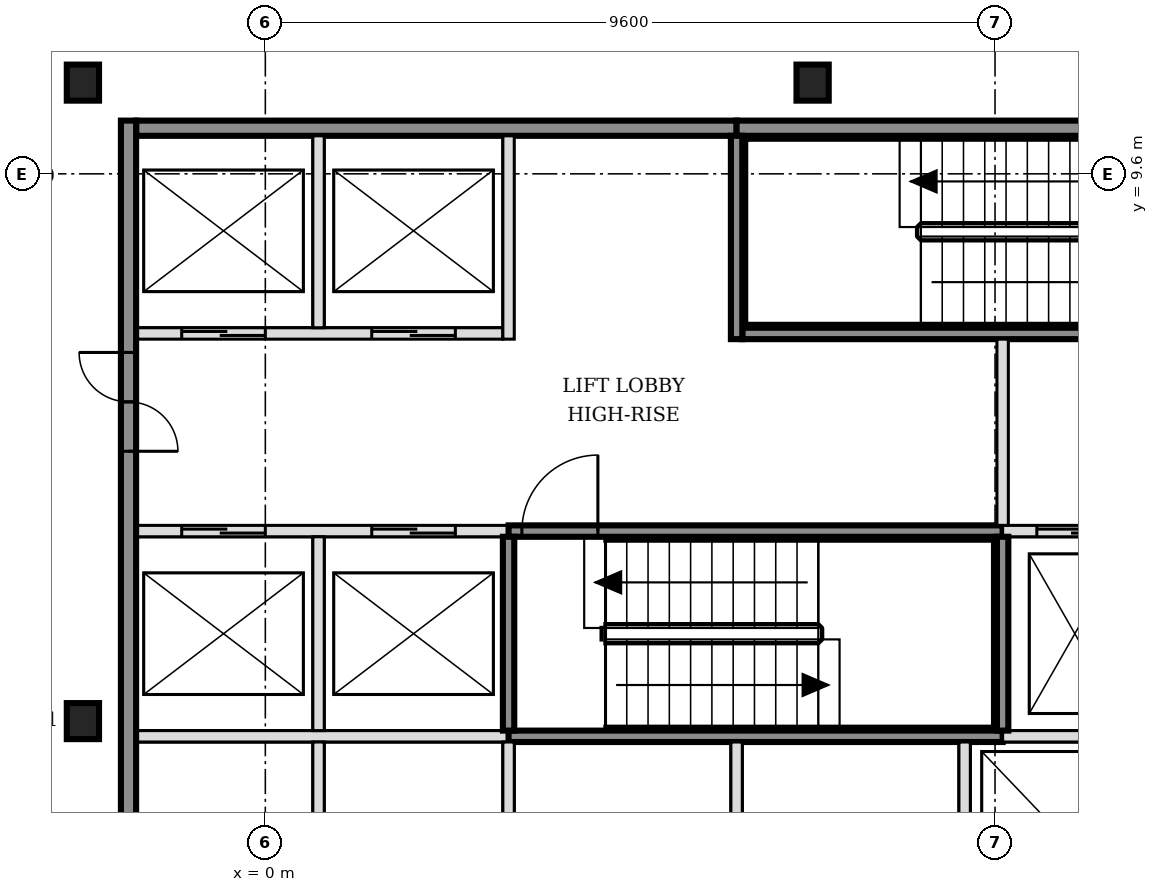
"""IFC4 building model, lengths in metres.
Left out: names, types, materials, properties, quantities, classifications, styles, units other than length and angle.
Written with IfcOpenShell. Run it as: python <this file> out.ifc"""

import sys

from ifc_helpers import new_model, si_unit, direction, frame, frame_2d, origin, origin_2d, place, context, subcontext, project, spatial, rectangle, i_section, extrude, element, fill, save


model = new_model("IFC4")
c1 = context("Model", 3, precision=1e-05, world=origin(), true_north=direction((0.0, 1.0)))
c2 = subcontext(c1, "Body", "Model", "MODEL_VIEW")
j1 = project(units=[si_unit("LENGTHUNIT", "METRE"), si_unit("PLANEANGLEUNIT", "RADIAN")], contexts=[c1])
p1 = place(None, origin())
s1 = spatial("IfcSite", under=j1, at=p1, CompositionType="ELEMENT")
p2 = place(p1, origin())
s2 = spatial("IfcBuilding", under=s1, at=p2, CompositionType="ELEMENT")
p3 = place(p2, frame((0.0, 0.0, 129.0)))
s3 = spatial("IfcBuildingStorey", under=s2, at=p3, CompositionType="ELEMENT", Elevation=129.0)
for number, where, z_axis, x_axis in (
    (1, (-2.4, 2.4, -0.15), (0.0, 0.0, 1.0), (1.0, 0.0, 0.0)),
    (2, (-2.4, 10.8, -0.15), (0.0, 0.0, 1.0), (1.0, 0.0, 0.0)),
    (3, (7.2, 10.8, -0.15), (0.0, 0.0, 1.0), (1.0, 0.0, 0.0)),
):
    element("IfcColumn", number, at=place(p3, frame(where, z_axis=z_axis, x_axis=x_axis)), inside=s3, PredefinedType="COLUMN", context=c2, shape_type="SweptSolid", body=[
        extrude(i_section(OverallWidth=0.424, OverallDepth=0.474, WebThickness=0.048, FlangeThickness=0.077, FilletRadius=0.015, at=origin_2d()), origin(), (0.0, 0.0, 1.0), 3.6),
    ])
p4 = place(p3, frame((-1.7, 2.2, 0.0), z_axis=(0.0, 0.0, 1.0), x_axis=(1.0, 0.0, 0.0)))
e4 = element("IfcWall", 4, at=p4, inside=s3, PredefinedType="SOLIDWALL", context=c2, shape_type="SweptSolid", body=[
    extrude(rectangle(XDim=4.9, YDim=0.15, at=frame_2d((2.45, 0.0))), origin(), (0.0, 0.0, 1.0), 3.45),
])
p5 = place(p3, frame((3.2, 2.2, 0.0), z_axis=(0.0, 0.0, 1.0), x_axis=(1.0, 0.0, 0.0)))
e5 = element("IfcWall", 5, at=p5, inside=s3, PredefinedType="SOLIDWALL", context=c2, shape_type="SweptSolid", body=[
    extrude(rectangle(XDim=6.5, YDim=0.15, at=frame_2d((3.25, 0.0))), origin(), (0.0, 0.0, 1.0), 3.45),
])
p6 = place(p3, frame((9.7, 2.2, 0.0), z_axis=(0.0, 0.0, 1.0), x_axis=(1.0, 0.0, 0.0)))
e6 = element("IfcWall", 6, at=p6, inside=s3, PredefinedType="SOLIDWALL", context=c2, shape_type="SweptSolid", body=[
    extrude(rectangle(XDim=4.525, YDim=0.15, at=frame_2d((2.263, 0.0))), origin(), (0.0, 0.0, 1.0), 3.45),
])
p7 = place(p3, frame((-1.7, 4.9, 0.0), z_axis=(0.0, 0.0, 1.0), x_axis=(1.0, 0.0, 0.0)))
e7 = element("IfcWall", 7, at=p7, inside=s3, PredefinedType="SOLIDWALL", context=c2, shape_type="SweptSolid", body=[
    extrude(rectangle(XDim=4.9, YDim=0.15, at=frame_2d((2.45, 0.0))), origin(), (0.0, 0.0, 1.0), 3.45),
])
p8 = place(p7, frame((0.6, 0.0, 0.0)))
e8 = element("IfcOpeningElement", 8, at=p8, cuts=e7, PredefinedType="OPENING", context=c2, shape_type="SweptSolid", body=[
    extrude(rectangle(XDim=1.1, YDim=2.1, at=frame_2d((0.55, 1.05))), frame((0.0, 0.085, 0.0), z_axis=(0.0, -1.0, 0.0), x_axis=(1.0, 0.0, 0.0)), (0.0, 0.0, 1.0), 0.17),
])
p9 = place(p7, frame((3.1, 0.0, 0.0)))
e9 = element("IfcOpeningElement", 9, at=p9, cuts=e7, PredefinedType="OPENING", context=c2, shape_type="SweptSolid", body=[
    extrude(rectangle(XDim=1.1, YDim=2.1, at=frame_2d((0.55, 1.05))), frame((0.0, 0.085, 0.0), z_axis=(0.0, -1.0, 0.0), x_axis=(1.0, 0.0, 0.0)), (0.0, 0.0, 1.0), 0.17),
])
p10 = place(p3, frame((3.2, 4.9, 0.0), z_axis=(0.0, 0.0, 1.0), x_axis=(1.0, 0.0, 0.0)))
e10 = element("IfcWall", 10, at=p10, inside=s3, PredefinedType="SOLIDWALL", context=c2, shape_type="SweptSolid", body=[
    extrude(rectangle(XDim=6.5, YDim=0.15, at=frame_2d((3.25, 0.0))), origin(), (0.0, 0.0, 1.0), 3.45),
])
p11 = place(p10, frame((0.175, 0.0, 0.0)))
e11 = element("IfcOpeningElement", 11, at=p11, cuts=e10, PredefinedType="OPENING", context=c2, shape_type="SweptSolid", body=[
    extrude(rectangle(XDim=1.0, YDim=2.1, at=frame_2d((0.5, 1.05))), frame((0.0, 0.085, 0.0), z_axis=(0.0, -1.0, 0.0), x_axis=(1.0, 0.0, 0.0)), (0.0, 0.0, 1.0), 0.17),
])
p12 = place(p3, frame((9.7, 4.9, 0.0), z_axis=(0.0, 0.0, 1.0), x_axis=(1.0, 0.0, 0.0)))
e12 = element("IfcWall", 12, at=p12, inside=s3, PredefinedType="SOLIDWALL", context=c2, shape_type="SweptSolid", body=[
    extrude(rectangle(XDim=6.4, YDim=0.15, at=frame_2d((3.2, 0.0))), origin(), (0.0, 0.0, 1.0), 3.45),
])
p13 = place(p12, frame((0.45, 0.0, 0.0)))
e13 = element("IfcOpeningElement", 13, at=p13, cuts=e12, PredefinedType="OPENING", context=c2, shape_type="SweptSolid", body=[
    extrude(rectangle(XDim=1.0, YDim=2.1, at=frame_2d((0.5, 1.05))), frame((0.0, 0.085, 0.0), z_axis=(0.0, -1.0, 0.0), x_axis=(1.0, 0.0, 0.0)), (0.0, 0.0, 1.0), 0.17),
])
p14 = place(p12, frame((2.35, 0.0, 0.0)))
e14 = element("IfcOpeningElement", 14, at=p14, cuts=e12, PredefinedType="OPENING", context=c2, shape_type="SweptSolid", body=[
    extrude(rectangle(XDim=1.0, YDim=2.1, at=frame_2d((0.5, 1.05))), frame((0.0, 0.085, 0.0), z_axis=(0.0, -1.0, 0.0), x_axis=(1.0, 0.0, 0.0)), (0.0, 0.0, 1.0), 0.17),
])
p15 = place(p12, frame((4.7, 0.0, 0.0)))
e15 = element("IfcOpeningElement", 15, at=p15, cuts=e12, PredefinedType="OPENING", context=c2, shape_type="SweptSolid", body=[
    extrude(rectangle(XDim=0.9, YDim=2.1, at=frame_2d((0.45, 1.05))), frame((0.0, 0.085, 0.0), z_axis=(0.0, -1.0, 0.0), x_axis=(1.0, 0.0, 0.0)), (0.0, 0.0, 1.0), 0.17),
])
p16 = place(p3, frame((-1.7, 7.5, 0.0), z_axis=(0.0, 0.0, 1.0), x_axis=(1.0, 0.0, 0.0)))
e16 = element("IfcWall", 16, at=p16, inside=s3, PredefinedType="SOLIDWALL", context=c2, shape_type="SweptSolid", body=[
    extrude(rectangle(XDim=4.825, YDim=0.15, at=frame_2d((2.413, 0.0))), origin(), (0.0, 0.0, 1.0), 3.45),
])
p17 = place(p16, frame((0.6, 0.0, 0.0)))
e17 = element("IfcOpeningElement", 17, at=p17, cuts=e16, PredefinedType="OPENING", context=c2, shape_type="SweptSolid", body=[
    extrude(rectangle(XDim=1.1, YDim=2.1, at=frame_2d((0.55, 1.05))), frame((0.0, 0.085, 0.0), z_axis=(0.0, -1.0, 0.0), x_axis=(1.0, 0.0, 0.0)), (0.0, 0.0, 1.0), 0.17),
])
p18 = place(p16, frame((3.1, 0.0, 0.0)))
e18 = element("IfcOpeningElement", 18, at=p18, cuts=e16, PredefinedType="OPENING", context=c2, shape_type="SweptSolid", body=[
    extrude(rectangle(XDim=1.1, YDim=2.1, at=frame_2d((0.55, 1.05))), frame((0.0, 0.085, 0.0), z_axis=(0.0, -1.0, 0.0), x_axis=(1.0, 0.0, 0.0)), (0.0, 0.0, 1.0), 0.17),
])
p19 = place(p3, frame((6.275, 7.5, 0.0), z_axis=(0.0, 0.0, 1.0), x_axis=(1.0, 0.0, 0.0)))
e19 = element("IfcWall", 19, at=p19, inside=s3, PredefinedType="SOLIDWALL", context=c2, shape_type="SweptSolid", body=[
    extrude(rectangle(XDim=6.425, YDim=0.15, at=frame_2d((3.212, 0.0))), origin(), (0.0, 0.0, 1.0), 3.45),
])
p20 = place(p19, frame((5.225, 0.0, 0.0)))
e20 = element("IfcOpeningElement", 20, at=p20, cuts=e19, PredefinedType="OPENING", context=c2, shape_type="SweptSolid", body=[
    extrude(rectangle(XDim=1.0, YDim=2.1, at=frame_2d((0.5, 1.05))), frame((0.0, 0.085, 0.0), z_axis=(0.0, -1.0, 0.0), x_axis=(1.0, 0.0, 0.0)), (0.0, 0.0, 1.0), 0.17),
])
p21 = place(p3, frame((-1.7, 10.2, 0.0), z_axis=(0.0, 0.0, 1.0), x_axis=(1.0, 0.0, 0.0)))
e21 = element("IfcWall", 21, at=p21, inside=s3, PredefinedType="SOLIDWALL", context=c2, shape_type="SweptSolid", body=[
    extrude(rectangle(XDim=7.9, YDim=0.2, at=frame_2d((3.95, 0.0))), origin(), (0.0, 0.0, 1.0), 3.45),
])
p22 = place(p3, frame((6.2, 10.2, 0.0), z_axis=(0.0, 0.0, 1.0), x_axis=(1.0, 0.0, 0.0)))
e22 = element("IfcWall", 22, at=p22, inside=s3, PredefinedType="SOLIDWALL", context=c2, shape_type="SweptSolid", body=[
    extrude(rectangle(XDim=6.5, YDim=0.2, at=frame_2d((3.25, 0.0))), origin(), (0.0, 0.0, 1.0), 3.45),
])
p23 = place(p3, frame((-1.8, -5.5, 0.0), z_axis=(0.0, 0.0, 1.0), x_axis=(0.0, 1.0, 0.0)))
e23 = element("IfcWall", 23, at=p23, inside=s3, PredefinedType="SOLIDWALL", context=c2, shape_type="SweptSolid", body=[
    extrude(rectangle(XDim=15.8, YDim=0.2, at=frame_2d((7.9, 0.0))), origin(), (0.0, 0.0, 1.0), 3.45),
])
p24 = place(p23, frame((3.05, 0.0, 0.0)))
e24 = element("IfcOpeningElement", 24, at=p24, cuts=e23, PredefinedType="OPENING", context=c2, shape_type="SweptSolid", body=[
    extrude(rectangle(XDim=1.3, YDim=2.1, at=frame_2d((0.65, 1.05))), frame((0.0, 0.11, 0.0), z_axis=(0.0, -1.0, 0.0), x_axis=(1.0, 0.0, 0.0)), (0.0, 0.0, 1.0), 0.22),
])
p25 = place(p23, frame((11.45, 0.0, 0.0)))
e25 = element("IfcOpeningElement", 25, at=p25, cuts=e23, PredefinedType="OPENING", context=c2, shape_type="SweptSolid", body=[
    extrude(rectangle(XDim=1.3, YDim=2.1, at=frame_2d((0.65, 1.05))), frame((0.0, 0.11, 0.0), z_axis=(0.0, -1.0, 0.0), x_axis=(1.0, 0.0, 0.0)), (0.0, 0.0, 1.0), 0.22),
])
p26 = place(p3, frame((0.7, -0.325, 0.0), z_axis=(0.0, 0.0, 1.0), x_axis=(0.0, 1.0, 0.0)))
e26 = element("IfcWall", 26, at=p26, inside=s3, PredefinedType="SOLIDWALL", context=c2, shape_type="SweptSolid", body=[
    extrude(rectangle(XDim=2.45, YDim=0.15, at=frame_2d((1.225, 0.0))), origin(), (0.0, 0.0, 1.0), 3.45),
])
p27 = place(p3, frame((0.7, 2.275, 0.0), z_axis=(0.0, 0.0, 1.0), x_axis=(0.0, 1.0, 0.0)))
e27 = element("IfcWall", 27, at=p27, inside=s3, PredefinedType="SOLIDWALL", context=c2, shape_type="SweptSolid", body=[
    extrude(rectangle(XDim=2.55, YDim=0.15, at=frame_2d((1.275, 0.0))), origin(), (0.0, 0.0, 1.0), 3.45),
])
p28 = place(p3, frame((0.7, 7.575, 0.0), z_axis=(0.0, 0.0, 1.0), x_axis=(0.0, 1.0, 0.0)))
e28 = element("IfcWall", 28, at=p28, inside=s3, PredefinedType="SOLIDWALL", context=c2, shape_type="SweptSolid", body=[
    extrude(rectangle(XDim=2.525, YDim=0.15, at=frame_2d((1.263, 0.0))), origin(), (0.0, 0.0, 1.0), 3.45),
])
p29 = place(p3, frame((3.2, -0.325, 0.0), z_axis=(0.0, 0.0, 1.0), x_axis=(0.0, 1.0, 0.0)))
e29 = element("IfcWall", 29, at=p29, inside=s3, PredefinedType="SOLIDWALL", context=c2, shape_type="SweptSolid", body=[
    extrude(rectangle(XDim=2.45, YDim=0.15, at=frame_2d((1.225, 0.0))), origin(), (0.0, 0.0, 1.0), 3.45),
])
p30 = place(p3, frame((3.2, 2.275, 0.0), z_axis=(0.0, 0.0, 1.0), x_axis=(0.0, 1.0, 0.0)))
e30 = element("IfcWall", 30, at=p30, inside=s3, PredefinedType="SOLIDWALL", context=c2, shape_type="SweptSolid", body=[
    extrude(rectangle(XDim=2.55, YDim=0.15, at=frame_2d((1.275, 0.0))), origin(), (0.0, 0.0, 1.0), 3.45),
])
p31 = place(p3, frame((3.2, 7.425, 0.0), z_axis=(0.0, 0.0, 1.0), x_axis=(0.0, 1.0, 0.0)))
e31 = element("IfcWall", 31, at=p31, inside=s3, PredefinedType="SOLIDWALL", context=c2, shape_type="SweptSolid", body=[
    extrude(rectangle(XDim=2.675, YDim=0.15, at=frame_2d((1.337, 0.0))), origin(), (0.0, 0.0, 1.0), 3.45),
])
p32 = place(p3, frame((6.2, -0.325, 0.0), z_axis=(0.0, 0.0, 1.0), x_axis=(0.0, 1.0, 0.0)))
e32 = element("IfcWall", 32, at=p32, inside=s3, PredefinedType="SOLIDWALL", context=c2, shape_type="SweptSolid", body=[
    extrude(rectangle(XDim=2.45, YDim=0.15, at=frame_2d((1.225, 0.0))), origin(), (0.0, 0.0, 1.0), 3.45),
])
p33 = place(p3, frame((6.2, 7.425, 0.0), z_axis=(0.0, 0.0, 1.0), x_axis=(0.0, 1.0, 0.0)))
e33 = element("IfcWall", 33, at=p33, inside=s3, PredefinedType="SOLIDWALL", context=c2, shape_type="SweptSolid", body=[
    extrude(rectangle(XDim=2.675, YDim=0.15, at=frame_2d((1.337, 0.0))), origin(), (0.0, 0.0, 1.0), 3.45),
])
p34 = place(p3, frame((9.2, -0.325, 0.0), z_axis=(0.0, 0.0, 1.0), x_axis=(0.0, 1.0, 0.0)))
e34 = element("IfcWall", 34, at=p34, inside=s3, PredefinedType="SOLIDWALL", context=c2, shape_type="SweptSolid", body=[
    extrude(rectangle(XDim=2.45, YDim=0.15, at=frame_2d((1.225, 0.0))), origin(), (0.0, 0.0, 1.0), 3.45),
])
p35 = place(p3, frame((9.7, 2.275, 0.0), z_axis=(0.0, 0.0, 1.0), x_axis=(0.0, 1.0, 0.0)))
e35 = element("IfcWall", 35, at=p35, inside=s3, PredefinedType="SOLIDWALL", context=c2, shape_type="SweptSolid", body=[
    extrude(rectangle(XDim=2.55, YDim=0.15, at=frame_2d((1.275, 0.0))), origin(), (0.0, 0.0, 1.0), 3.45),
])
p36 = place(p3, frame((9.7, 4.975, 0.0), z_axis=(0.0, 0.0, 1.0), x_axis=(0.0, 1.0, 0.0)))
e36 = element("IfcWall", 36, at=p36, inside=s3, PredefinedType="SOLIDWALL", context=c2, shape_type="SweptSolid", body=[
    extrude(rectangle(XDim=2.45, YDim=0.15, at=frame_2d((1.225, 0.0))), origin(), (0.0, 0.0, 1.0), 3.45),
])
p37 = place(p3, frame((-14.475, 6.919, 0.0), z_axis=(0.0, 0.0, 1.0), x_axis=(0.707106781187, 0.707106781187, 0.0)))
e37 = element("IfcWall", 37, at=p37, inside=s3, PredefinedType="PARTITIONING", context=c2, shape_type="SweptSolid", body=[
    extrude(rectangle(XDim=20.581, YDim=0.15, at=frame_2d((10.291, 0.0))), origin(), (0.0, 0.0, 1.0), 2.73),
])
p38 = place(p37, frame((17.983, 0.0, 0.0)))
e38 = element("IfcOpeningElement", 38, at=p38, cuts=e37, PredefinedType="OPENING", context=c2, shape_type="SweptSolid", body=[
    extrude(rectangle(XDim=0.9, YDim=2.1, at=frame_2d((0.45, 1.05))), frame((0.0, 0.085, 0.0), z_axis=(0.0, -1.0, 0.0), x_axis=(1.0, 0.0, 0.0)), (0.0, 0.0, 1.0), 0.17),
])
p39 = place(p37, frame((10.77, 0.0, 0.0)))
e39 = element("IfcOpeningElement", 39, at=p39, cuts=e37, PredefinedType="OPENING", context=c2, shape_type="SweptSolid", body=[
    extrude(rectangle(XDim=0.9, YDim=2.1, at=frame_2d((0.45, 1.05))), frame((0.0, 0.085, 0.0), z_axis=(0.0, -1.0, 0.0), x_axis=(1.0, 0.0, 0.0)), (0.0, 0.0, 1.0), 0.17),
])
p40 = place(p37, frame((7.014, 0.0, 0.0)))
e40 = element("IfcOpeningElement", 40, at=p40, cuts=e37, PredefinedType="OPENING", context=c2, shape_type="SweptSolid", body=[
    extrude(rectangle(XDim=0.9, YDim=2.1, at=frame_2d((0.45, 1.05))), frame((0.0, 0.085, 0.0), z_axis=(0.0, -1.0, 0.0), x_axis=(1.0, 0.0, 0.0)), (0.0, 0.0, 1.0), 0.17),
])
p41 = place(p37, frame((1.499, 0.0, 0.0)))
e41 = element("IfcOpeningElement", 41, at=p41, cuts=e37, PredefinedType="OPENING", context=c2, shape_type="SweptSolid", body=[
    extrude(rectangle(XDim=0.9, YDim=2.1, at=frame_2d((0.45, 1.05))), frame((0.0, 0.085, 0.0), z_axis=(0.0, -1.0, 0.0), x_axis=(1.0, 0.0, 0.0)), (0.0, 0.0, 1.0), 0.17),
])
p42 = place(p8, origin())
e42 = element("IfcDoor", 42, at=p42, inside=s3, OperationType="DOUBLE_DOOR_SLIDING", PredefinedType="DOOR", context=c2, shape_type="SweptSolid", body=[
    extrude(rectangle(XDim=1.1, YDim=2.1, at=frame_2d((0.55, 1.05))), frame((0.0, 0.025, 0.0), z_axis=(0.0, -1.0, 0.0), x_axis=(1.0, 0.0, 0.0)), (0.0, 0.0, 1.0), 0.05),
])
fill(e8, e42)
p43 = place(p9, origin())
e43 = element("IfcDoor", 43, at=p43, inside=s3, OperationType="DOUBLE_DOOR_SLIDING", PredefinedType="DOOR", context=c2, shape_type="SweptSolid", body=[
    extrude(rectangle(XDim=1.1, YDim=2.1, at=frame_2d((0.55, 1.05))), frame((0.0, 0.025, 0.0), z_axis=(0.0, -1.0, 0.0), x_axis=(1.0, 0.0, 0.0)), (0.0, 0.0, 1.0), 0.05),
])
fill(e9, e43)
p44 = place(p17, origin())
e44 = element("IfcDoor", 44, at=p44, inside=s3, OperationType="DOUBLE_DOOR_SLIDING", PredefinedType="DOOR", context=c2, shape_type="SweptSolid", body=[
    extrude(rectangle(XDim=1.1, YDim=2.1, at=frame_2d((0.55, 1.05))), frame((0.0, 0.025, 0.0), z_axis=(0.0, -1.0, 0.0), x_axis=(1.0, 0.0, 0.0)), (0.0, 0.0, 1.0), 0.05),
])
fill(e17, e44)
p45 = place(p18, origin())
e45 = element("IfcDoor", 45, at=p45, inside=s3, OperationType="DOUBLE_DOOR_SLIDING", PredefinedType="DOOR", context=c2, shape_type="SweptSolid", body=[
    extrude(rectangle(XDim=1.1, YDim=2.1, at=frame_2d((0.55, 1.05))), frame((0.0, 0.025, 0.0), z_axis=(0.0, -1.0, 0.0), x_axis=(1.0, 0.0, 0.0)), (0.0, 0.0, 1.0), 0.05),
])
fill(e18, e45)
p46 = place(p13, origin())
e46 = element("IfcDoor", 46, at=p46, inside=s3, OperationType="DOUBLE_DOOR_SLIDING", PredefinedType="DOOR", context=c2, shape_type="SweptSolid", body=[
    extrude(rectangle(XDim=1.0, YDim=2.1, at=frame_2d((0.5, 1.05))), frame((0.0, 0.025, 0.0), z_axis=(0.0, -1.0, 0.0), x_axis=(1.0, 0.0, 0.0)), (0.0, 0.0, 1.0), 0.05),
])
fill(e13, e46)
p47 = place(p11, origin())
e47 = element("IfcDoor", 47, at=p47, inside=s3, OperationType="SINGLE_SWING_RIGHT", PredefinedType="DOOR", context=c2, shape_type="SweptSolid", body=[
    extrude(rectangle(XDim=1.0, YDim=2.1, at=frame_2d((0.5, 1.05))), frame((0.0, 0.025, 0.0), z_axis=(0.0, -1.0, 0.0), x_axis=(1.0, 0.0, 0.0)), (0.0, 0.0, 1.0), 0.05),
])
fill(e11, e47)
p48 = place(p25, origin())
e48 = element("IfcDoor", 48, at=p48, inside=s3, OperationType="DOUBLE_DOOR_SINGLE_SWING", PredefinedType="DOOR", context=c2, shape_type="SweptSolid", body=[
    extrude(rectangle(XDim=1.3, YDim=2.1, at=frame_2d((0.65, 1.05))), frame((0.0, 0.025, 0.0), z_axis=(0.0, -1.0, 0.0), x_axis=(1.0, 0.0, 0.0)), (0.0, 0.0, 1.0), 0.05),
])
fill(e25, e48)
save(model, sys.argv[1])
